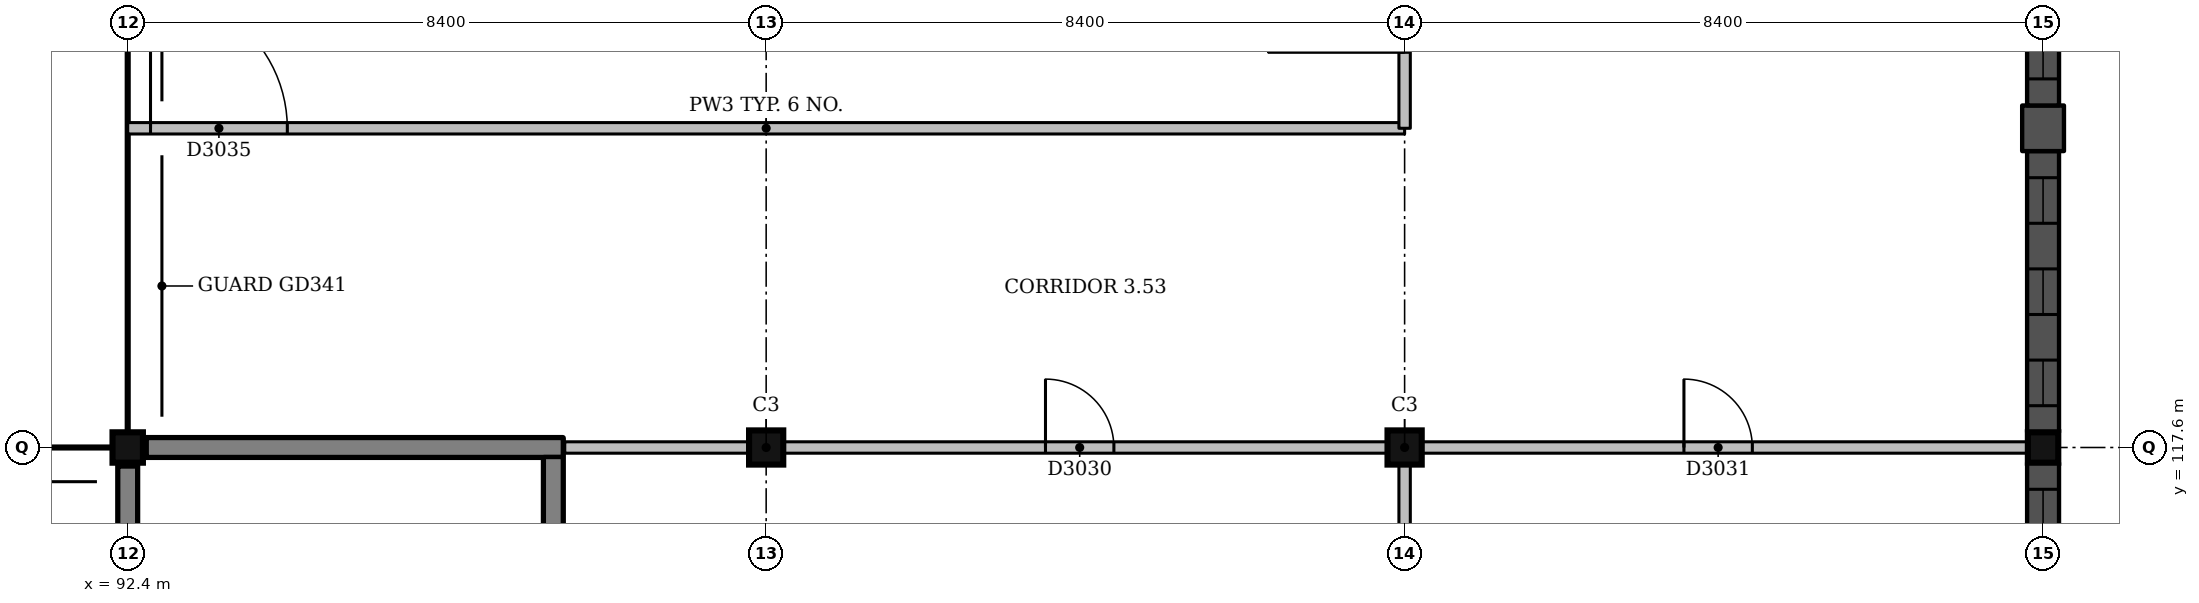
"""IFC4 building model, lengths in metres.
Left out: names, types, materials, properties, quantities, classifications, styles, units other than length and angle.
Written with IfcOpenShell. Run it as: python <this file> out.ifc"""

import sys

from ifc_helpers import new_model, si_unit, direction, frame, frame_2d, origin, origin_2d, place, context, subcontext, project, spatial, rectangle, extrude, element, fill, save


model = new_model("IFC4")
c1 = context("Model", 3, precision=1e-05, world=origin(), true_north=direction((0.0, 1.0)))
c2 = subcontext(c1, "Body", "Model", "MODEL_VIEW")
j1 = project(units=[si_unit("LENGTHUNIT", "METRE"), si_unit("PLANEANGLEUNIT", "RADIAN")], contexts=[c1])
p1 = place(None, origin())
s1 = spatial("IfcSite", under=j1, at=p1, CompositionType="ELEMENT")
p2 = place(p1, origin())
s2 = spatial("IfcBuilding", under=s1, at=p2, CompositionType="ELEMENT")
p3 = place(p2, frame((0.0, 0.0, 13.5)))
s3 = spatial("IfcBuildingStorey", under=s2, at=p3, CompositionType="ELEMENT", Elevation=13.5)
p4 = place(p3, frame((92.4, 117.6, 0.0), z_axis=(0.0, 0.0, 1.0), x_axis=(1.0, 0.0, 0.0)))
e1 = element("IfcColumn", 1, at=p4, inside=s3, PredefinedType="COLUMN", context=c2, shape_type="SweptSolid", body=[
    extrude(rectangle(XDim=0.4, YDim=0.4, at=origin_2d()), origin(), (0.0, 0.0, 1.0), 4.5),
])
for number, where, z_axis, x_axis in (
    (2, (100.8, 117.6, 0.0), (0.0, 0.0, 1.0), (1.0, 0.0, 0.0)),
    (3, (109.2, 117.6, 0.0), (0.0, 0.0, 1.0), (1.0, 0.0, 0.0)),
):
    element("IfcColumn", number, at=place(p3, frame(where, z_axis=z_axis, x_axis=x_axis)), inside=s3, PredefinedType="COLUMN", context=c2, shape_type="SweptSolid", body=[
        extrude(rectangle(XDim=0.45, YDim=0.45, at=origin_2d()), origin(), (0.0, 0.0, 1.0), 4.5),
    ])
p5 = place(p3, frame((117.6, 117.6, 0.0), z_axis=(0.0, 0.0, 1.0), x_axis=(1.0, 0.0, 0.0)))
e4 = element("IfcColumn", 4, at=p5, inside=s3, PredefinedType="COLUMN", context=c2, shape_type="SweptSolid", body=[
    extrude(rectangle(XDim=0.4, YDim=0.4, at=origin_2d()), origin(), (0.0, 0.0, 1.0), 4.5),
])
p6 = place(p3, frame((92.65, 117.6, 0.0), z_axis=(0.0, 0.0, 1.0), x_axis=(1.0, 0.0, 0.0)))
e5 = element("IfcWall", 5, at=p6, inside=s3, PredefinedType="SHEAR", context=c2, shape_type="SweptSolid", body=[
    extrude(rectangle(XDim=5.475, YDim=0.25, at=frame_2d((2.738, 0.0))), origin(), (0.0, 0.0, 1.0), 4.5),
])
p7 = place(p3, frame((92.4, 109.4, 0.0), z_axis=(0.0, 0.0, 1.0), x_axis=(0.0, 1.0, 0.0)))
e6 = element("IfcWall", 6, at=p7, inside=s3, PredefinedType="SHEAR", context=c2, shape_type="SweptSolid", body=[
    extrude(rectangle(XDim=7.95, YDim=0.25, at=frame_2d((3.975, 0.0))), origin(), (0.0, 0.0, 1.0), 4.5),
])
p8 = place(p7, frame((0.45, 0.0, 0.0)))
e7 = element("IfcOpeningElement", 7, at=p8, cuts=e6, PredefinedType="OPENING", context=c2, shape_type="SweptSolid", body=[
    extrude(rectangle(XDim=1.0, YDim=2.1, at=frame_2d((0.5, 1.05))), frame((0.0, 0.135, 0.0), z_axis=(0.0, -1.0, 0.0), x_axis=(1.0, 0.0, 0.0)), (0.0, 0.0, 1.0), 0.27),
])
p9 = place(p3, frame((98.0, 109.325, 0.0), z_axis=(0.0, 0.0, 1.0), x_axis=(0.0, 1.0, 0.0)))
e8 = element("IfcWall", 8, at=p9, inside=s3, PredefinedType="SHEAR", context=c2, shape_type="SweptSolid", body=[
    extrude(rectangle(XDim=8.15, YDim=0.25, at=frame_2d((4.075, 0.0))), origin(), (0.0, 0.0, 1.0), 4.5),
])
p10 = place(p3, frame((117.6, 113.7, 0.0), z_axis=(0.0, 0.0, 1.0), x_axis=(0.0, 1.0, 0.0)))
e9 = element("IfcWall", 9, at=p10, inside=s3, PredefinedType="SOLIDWALL", context=c2, shape_type="SweptSolid", body=[
    extrude(rectangle(XDim=3.7, YDim=0.42, at=frame_2d((1.85, 0.0))), origin(), (0.0, 0.0, 1.0), 4.2),
])
p11 = place(p10, frame((0.35, 0.0, 1.0)))
e10 = element("IfcOpeningElement", 10, at=p11, cuts=e9, PredefinedType="OPENING", context=c2, shape_type="SweptSolid", body=[
    extrude(rectangle(XDim=0.6, YDim=2.1, at=frame_2d((0.3, 1.05))), frame((0.0, 0.22, 0.0), z_axis=(0.0, -1.0, 0.0), x_axis=(1.0, 0.0, 0.0)), (0.0, 0.0, 1.0), 0.44),
])
p12 = place(p10, frame((1.55, 0.0, 1.0)))
e11 = element("IfcOpeningElement", 11, at=p12, cuts=e9, PredefinedType="OPENING", context=c2, shape_type="SweptSolid", body=[
    extrude(rectangle(XDim=0.6, YDim=2.1, at=frame_2d((0.3, 1.05))), frame((0.0, 0.22, 0.0), z_axis=(0.0, -1.0, 0.0), x_axis=(1.0, 0.0, 0.0)), (0.0, 0.0, 1.0), 0.44),
])
p13 = place(p10, frame((2.75, 0.0, 1.0)))
e12 = element("IfcOpeningElement", 12, at=p13, cuts=e9, PredefinedType="OPENING", context=c2, shape_type="SweptSolid", body=[
    extrude(rectangle(XDim=0.6, YDim=2.1, at=frame_2d((0.3, 1.05))), frame((0.0, 0.22, 0.0), z_axis=(0.0, -1.0, 0.0), x_axis=(1.0, 0.0, 0.0)), (0.0, 0.0, 1.0), 0.44),
])
p14 = place(p3, frame((117.6, 117.8, 0.0), z_axis=(0.0, 0.0, 1.0), x_axis=(0.0, 1.0, 0.0)))
e13 = element("IfcWall", 13, at=p14, inside=s3, PredefinedType="SOLIDWALL", context=c2, shape_type="SweptSolid", body=[
    extrude(rectangle(XDim=3.7, YDim=0.42, at=frame_2d((1.85, 0.0))), origin(), (0.0, 0.0, 1.0), 3.45),
])
p15 = place(p14, frame((0.35, 0.0, 1.0)))
e14 = element("IfcOpeningElement", 14, at=p15, cuts=e13, PredefinedType="OPENING", context=c2, shape_type="SweptSolid", body=[
    extrude(rectangle(XDim=0.6, YDim=2.1, at=frame_2d((0.3, 1.05))), frame((0.0, 0.22, 0.0), z_axis=(0.0, -1.0, 0.0), x_axis=(1.0, 0.0, 0.0)), (0.0, 0.0, 1.0), 0.44),
])
p16 = place(p14, frame((1.55, 0.0, 1.0)))
e15 = element("IfcOpeningElement", 15, at=p16, cuts=e13, PredefinedType="OPENING", context=c2, shape_type="SweptSolid", body=[
    extrude(rectangle(XDim=0.6, YDim=2.1, at=frame_2d((0.3, 1.05))), frame((0.0, 0.22, 0.0), z_axis=(0.0, -1.0, 0.0), x_axis=(1.0, 0.0, 0.0)), (0.0, 0.0, 1.0), 0.44),
])
p17 = place(p14, frame((2.75, 0.0, 1.0)))
e16 = element("IfcOpeningElement", 16, at=p17, cuts=e13, PredefinedType="OPENING", context=c2, shape_type="SweptSolid", body=[
    extrude(rectangle(XDim=0.6, YDim=2.1, at=frame_2d((0.3, 1.05))), frame((0.0, 0.22, 0.0), z_axis=(0.0, -1.0, 0.0), x_axis=(1.0, 0.0, 0.0)), (0.0, 0.0, 1.0), 0.44),
])
p18 = place(p3, frame((117.6, 121.5, 0.0), z_axis=(0.0, 0.0, 1.0), x_axis=(0.0, 1.0, 0.0)))
e17 = element("IfcWall", 17, at=p18, inside=s3, PredefinedType="SOLIDWALL", context=c2, shape_type="SweptSolid", body=[
    extrude(rectangle(XDim=0.6, YDim=0.55, at=frame_2d((0.3, 0.0))), origin(), (0.0, 0.0, 1.0), 3.45),
])
p19 = place(p3, frame((117.6, 122.1, 0.0), z_axis=(0.0, 0.0, 1.0), x_axis=(0.0, 1.0, 0.0)))
e18 = element("IfcWall", 18, at=p19, inside=s3, PredefinedType="SOLIDWALL", context=c2, shape_type="SweptSolid", body=[
    extrude(rectangle(XDim=3.7, YDim=0.42, at=frame_2d((1.85, 0.0))), origin(), (0.0, 0.0, 1.0), 3.45),
])
p20 = place(p19, frame((0.35, 0.0, 1.0)))
e19 = element("IfcOpeningElement", 19, at=p20, cuts=e18, PredefinedType="OPENING", context=c2, shape_type="SweptSolid", body=[
    extrude(rectangle(XDim=0.6, YDim=2.1, at=frame_2d((0.3, 1.05))), frame((0.0, 0.22, 0.0), z_axis=(0.0, -1.0, 0.0), x_axis=(1.0, 0.0, 0.0)), (0.0, 0.0, 1.0), 0.44),
])
p21 = place(p19, frame((1.55, 0.0, 1.0)))
e20 = element("IfcOpeningElement", 20, at=p21, cuts=e18, PredefinedType="OPENING", context=c2, shape_type="SweptSolid", body=[
    extrude(rectangle(XDim=0.6, YDim=2.1, at=frame_2d((0.3, 1.05))), frame((0.0, 0.22, 0.0), z_axis=(0.0, -1.0, 0.0), x_axis=(1.0, 0.0, 0.0)), (0.0, 0.0, 1.0), 0.44),
])
p22 = place(p19, frame((2.75, 0.0, 1.0)))
e21 = element("IfcOpeningElement", 21, at=p22, cuts=e18, PredefinedType="OPENING", context=c2, shape_type="SweptSolid", body=[
    extrude(rectangle(XDim=0.6, YDim=2.1, at=frame_2d((0.3, 1.05))), frame((0.0, 0.22, 0.0), z_axis=(0.0, -1.0, 0.0), x_axis=(1.0, 0.0, 0.0)), (0.0, 0.0, 1.0), 0.44),
])
p23 = place(p3, frame((98.15, 117.6, 0.0), z_axis=(0.0, 0.0, 1.0), x_axis=(1.0, 0.0, 0.0)))
e22 = element("IfcWall", 22, at=p23, inside=s3, PredefinedType="PARTITIONING", context=c2, shape_type="SweptSolid", body=[
    extrude(rectangle(XDim=2.425, YDim=0.15, at=frame_2d((1.212, 0.0))), origin(), (0.0, 0.0, 1.0), 3.6),
])
p24 = place(p3, frame((101.025, 117.6, 0.0), z_axis=(0.0, 0.0, 1.0), x_axis=(1.0, 0.0, 0.0)))
e23 = element("IfcWall", 23, at=p24, inside=s3, PredefinedType="PARTITIONING", context=c2, shape_type="SweptSolid", body=[
    extrude(rectangle(XDim=7.95, YDim=0.15, at=frame_2d((3.975, 0.0))), origin(), (0.0, 0.0, 1.0), 3.5),
])
p25 = place(p24, frame((3.45, 0.0, 0.0)))
e24 = element("IfcOpeningElement", 24, at=p25, cuts=e23, PredefinedType="OPENING", context=c2, shape_type="SweptSolid", body=[
    extrude(rectangle(XDim=0.9, YDim=2.1, at=frame_2d((0.45, 1.05))), frame((0.0, 0.085, 0.0), z_axis=(0.0, -1.0, 0.0), x_axis=(1.0, 0.0, 0.0)), (0.0, 0.0, 1.0), 0.17),
])
p26 = place(p3, frame((109.425, 117.6, 0.0), z_axis=(0.0, 0.0, 1.0), x_axis=(1.0, 0.0, 0.0)))
e25 = element("IfcWall", 25, at=p26, inside=s3, PredefinedType="PARTITIONING", context=c2, shape_type="SweptSolid", body=[
    extrude(rectangle(XDim=7.975, YDim=0.15, at=frame_2d((3.987, 0.0))), origin(), (0.0, 0.0, 1.0), 3.5),
])
p27 = place(p26, frame((3.45, 0.0, 0.0)))
e26 = element("IfcOpeningElement", 26, at=p27, cuts=e25, PredefinedType="OPENING", context=c2, shape_type="SweptSolid", body=[
    extrude(rectangle(XDim=0.9, YDim=2.1, at=frame_2d((0.45, 1.05))), frame((0.0, 0.085, 0.0), z_axis=(0.0, -1.0, 0.0), x_axis=(1.0, 0.0, 0.0)), (0.0, 0.0, 1.0), 0.17),
])
p28 = place(p3, frame((92.4, 121.8, 0.0), z_axis=(0.0, 0.0, 1.0), x_axis=(1.0, 0.0, 0.0)))
e27 = element("IfcWall", 27, at=p28, inside=s3, PredefinedType="PARTITIONING", context=c2, shape_type="SweptSolid", body=[
    extrude(rectangle(XDim=16.8, YDim=0.15, at=frame_2d((8.4, 0.0))), origin(), (0.0, 0.0, 1.0), 3.4),
])
p29 = place(p28, frame((0.3, 0.0, 0.0)))
e28 = element("IfcOpeningElement", 28, at=p29, cuts=e27, PredefinedType="OPENING", context=c2, shape_type="SweptSolid", body=[
    extrude(rectangle(XDim=1.8, YDim=2.1, at=frame_2d((0.9, 1.05))), frame((0.0, 0.085, 0.0), z_axis=(0.0, -1.0, 0.0), x_axis=(1.0, 0.0, 0.0)), (0.0, 0.0, 1.0), 0.17),
])
p30 = place(p3, frame((109.2, 121.8, 0.0), z_axis=(0.0, 0.0, 1.0), x_axis=(0.0, 1.0, 0.0)))
e29 = element("IfcWall", 29, at=p30, inside=s3, PredefinedType="PARTITIONING", context=c2, shape_type="SweptSolid", body=[
    extrude(rectangle(XDim=3.975, YDim=0.15, at=frame_2d((1.987, 0.0))), origin(), (0.0, 0.0, 1.0), 3.5),
])
p31 = place(p30, frame((1.0, 0.0, 0.0)))
e30 = element("IfcOpeningElement", 30, at=p31, cuts=e29, PredefinedType="OPENING", context=c2, shape_type="SweptSolid", body=[
    extrude(rectangle(XDim=1.8, YDim=2.1, at=frame_2d((0.9, 1.05))), frame((0.0, 0.085, 0.0), z_axis=(0.0, -1.0, 0.0), x_axis=(1.0, 0.0, 0.0)), (0.0, 0.0, 1.0), 0.17),
])
p32 = place(p3, frame((109.2, 109.4, 0.0), z_axis=(0.0, 0.0, 1.0), x_axis=(0.0, 1.0, 0.0)))
e31 = element("IfcWall", 31, at=p32, inside=s3, PredefinedType="PARTITIONING", context=c2, shape_type="SweptSolid", body=[
    extrude(rectangle(XDim=7.975, YDim=0.15, at=frame_2d((3.988, 0.0))), origin(), (0.0, 0.0, 1.0), 4.15),
])
p33 = place(p13, origin())
e32 = element("IfcWindow", 32, at=p33, inside=s3, PartitioningType="SINGLE_PANEL", PredefinedType="WINDOW", context=c2, shape_type="SweptSolid", body=[
    extrude(rectangle(XDim=0.6, YDim=2.1, at=frame_2d((0.3, 1.05))), frame((0.0, 0.15, 0.0), z_axis=(0.0, -1.0, 0.0), x_axis=(1.0, 0.0, 0.0)), (0.0, 0.0, 1.0), 0.06),
])
fill(e12, e32)
p34 = place(p15, origin())
e33 = element("IfcWindow", 33, at=p34, inside=s3, PartitioningType="SINGLE_PANEL", PredefinedType="WINDOW", context=c2, shape_type="SweptSolid", body=[
    extrude(rectangle(XDim=0.6, YDim=2.1, at=frame_2d((0.3, 1.05))), frame((0.0, 0.15, 0.0), z_axis=(0.0, -1.0, 0.0), x_axis=(1.0, 0.0, 0.0)), (0.0, 0.0, 1.0), 0.06),
])
fill(e14, e33)
p35 = place(p16, origin())
e34 = element("IfcWindow", 34, at=p35, inside=s3, PartitioningType="SINGLE_PANEL", PredefinedType="WINDOW", context=c2, shape_type="SweptSolid", body=[
    extrude(rectangle(XDim=0.6, YDim=2.1, at=frame_2d((0.3, 1.05))), frame((0.0, 0.15, 0.0), z_axis=(0.0, -1.0, 0.0), x_axis=(1.0, 0.0, 0.0)), (0.0, 0.0, 1.0), 0.06),
])
fill(e15, e34)
p36 = place(p17, origin())
e35 = element("IfcWindow", 35, at=p36, inside=s3, PartitioningType="SINGLE_PANEL", PredefinedType="WINDOW", context=c2, shape_type="SweptSolid", body=[
    extrude(rectangle(XDim=0.6, YDim=2.1, at=frame_2d((0.3, 1.05))), frame((0.0, 0.15, 0.0), z_axis=(0.0, -1.0, 0.0), x_axis=(1.0, 0.0, 0.0)), (0.0, 0.0, 1.0), 0.06),
])
fill(e16, e35)
p37 = place(p20, origin())
e36 = element("IfcWindow", 36, at=p37, inside=s3, PartitioningType="SINGLE_PANEL", PredefinedType="WINDOW", context=c2, shape_type="SweptSolid", body=[
    extrude(rectangle(XDim=0.6, YDim=2.1, at=frame_2d((0.3, 1.05))), frame((0.0, 0.15, 0.0), z_axis=(0.0, -1.0, 0.0), x_axis=(1.0, 0.0, 0.0)), (0.0, 0.0, 1.0), 0.06),
])
fill(e19, e36)
p38 = place(p25, origin())
e37 = element("IfcDoor", 37, at=p38, inside=s3, OperationType="SINGLE_SWING_LEFT", PredefinedType="DOOR", context=c2, shape_type="SweptSolid", body=[
    extrude(rectangle(XDim=0.9, YDim=2.1, at=frame_2d((0.45, 1.05))), frame((0.0, 0.025, 0.0), z_axis=(0.0, -1.0, 0.0), x_axis=(1.0, 0.0, 0.0)), (0.0, 0.0, 1.0), 0.05),
])
fill(e24, e37)
p39 = place(p27, origin())
e38 = element("IfcDoor", 38, at=p39, inside=s3, OperationType="SINGLE_SWING_LEFT", PredefinedType="DOOR", context=c2, shape_type="SweptSolid", body=[
    extrude(rectangle(XDim=0.9, YDim=2.1, at=frame_2d((0.45, 1.05))), frame((0.0, 0.025, 0.0), z_axis=(0.0, -1.0, 0.0), x_axis=(1.0, 0.0, 0.0)), (0.0, 0.0, 1.0), 0.05),
])
fill(e26, e38)
p40 = place(p29, origin())
e39 = element("IfcDoor", 39, at=p40, inside=s3, OperationType="DOUBLE_DOOR_SINGLE_SWING", PredefinedType="DOOR", context=c2, shape_type="SweptSolid", body=[
    extrude(rectangle(XDim=1.8, YDim=2.1, at=frame_2d((0.9, 1.05))), frame((0.0, 0.025, 0.0), z_axis=(0.0, -1.0, 0.0), x_axis=(1.0, 0.0, 0.0)), (0.0, 0.0, 1.0), 0.05),
])
fill(e28, e39)
save(model, sys.argv[1])
